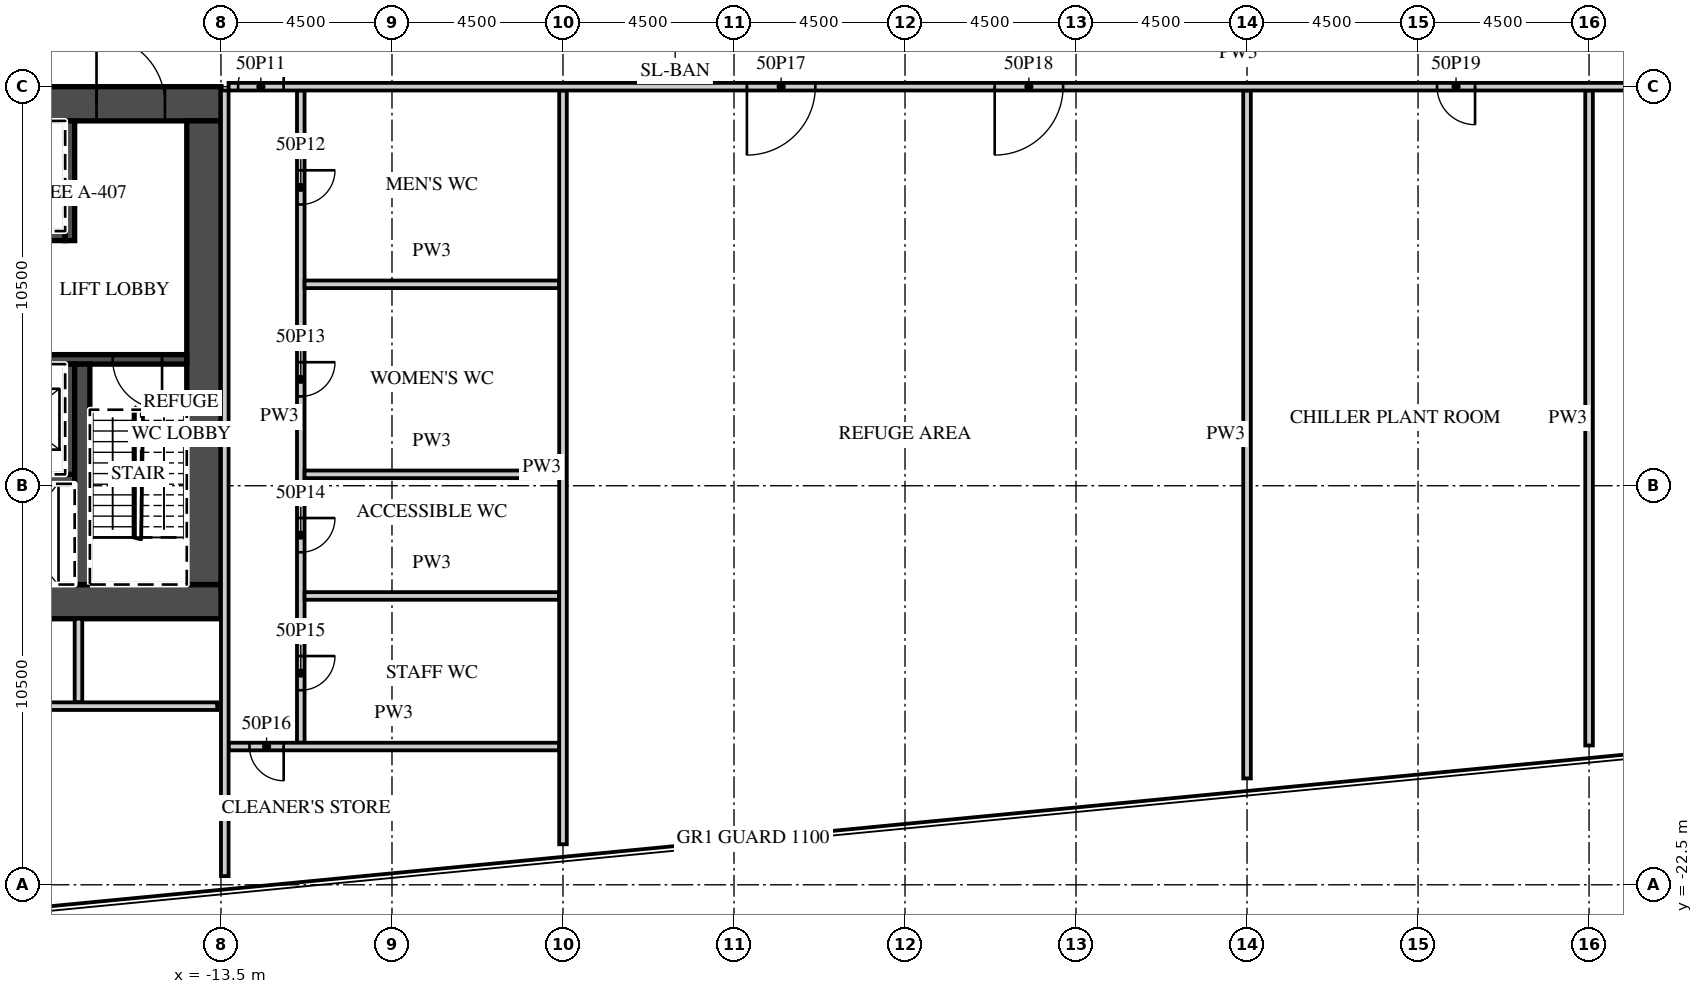
"""IFC4 building model, lengths in metres.
Left out: names, types, materials, properties, quantities, classifications, styles, units other than length and angle.
Written with IfcOpenShell. Run it as: python <this file> out.ifc"""

import sys

from ifc_helpers import new_model, si_unit, direction, frame, frame_2d, origin, place, context, subcontext, project, spatial, rectangle, extrude, element, fill, save


model = new_model("IFC4")
c1 = context("Model", 3, precision=1e-05, world=origin(), true_north=direction((0.0, 1.0)))
c2 = subcontext(c1, "Body", "Model", "MODEL_VIEW")
j1 = project(units=[si_unit("LENGTHUNIT", "METRE"), si_unit("PLANEANGLEUNIT", "RADIAN")], contexts=[c1])
p1 = place(None, origin())
s1 = spatial("IfcSite", under=j1, at=p1, CompositionType="ELEMENT")
p2 = place(p1, origin())
s2 = spatial("IfcBuilding", under=s1, at=p2, CompositionType="ELEMENT")
p3 = place(p2, frame((0.0, 0.0, 206.5)))
s3 = spatial("IfcBuildingStorey", under=s2, at=p3, CompositionType="ELEMENT", Elevation=206.5)
p4 = place(p3, frame((-31.5, -1.95, 0.0), z_axis=(0.0, 0.0, 1.0), x_axis=(1.0, 0.0, 0.0)))
e1 = element("IfcWall", 1, at=p4, inside=s3, PredefinedType="SHEAR", context=c2, shape_type="SweptSolid", body=[
    extrude(rectangle(XDim=18.0, YDim=0.9, at=frame_2d((9.0, 0.0))), origin(), (0.0, 0.0, 1.0), 4.2),
])
p5 = place(p4, frame((14.725, 0.0, 0.0)))
e2 = element("IfcOpeningElement", 2, at=p5, cuts=e1, PredefinedType="OPENING", context=c2, shape_type="SweptSolid", body=[
    extrude(rectangle(XDim=1.8, YDim=2.1, at=frame_2d((0.9, 1.05))), frame((0.0, 0.46, 0.0), z_axis=(0.0, -1.0, 0.0), x_axis=(1.0, 0.0, 0.0)), (0.0, 0.0, 1.0), 0.92),
])
p6 = place(p3, frame((-20.3, -15.05, 0.0), z_axis=(0.0, 0.0, 1.0), x_axis=(1.0, 0.0, 0.0)))
e3 = element("IfcWall", 3, at=p6, inside=s3, PredefinedType="SHEAR", context=c2, shape_type="SweptSolid", body=[
    extrude(rectangle(XDim=6.8, YDim=0.9, at=frame_2d((3.4, 0.0))), origin(), (0.0, 0.0, 1.0), 4.2),
])
p7 = place(p6, frame((0.875, 0.0, 0.0)))
e4 = element("IfcOpeningElement", 4, at=p7, cuts=e3, PredefinedType="OPENING", context=c2, shape_type="SweptSolid", body=[
    extrude(rectangle(XDim=1.2, YDim=2.1, at=frame_2d((0.6, 1.05))), frame((0.0, 0.46, 0.0), z_axis=(0.0, -1.0, 0.0), x_axis=(1.0, 0.0, 0.0)), (0.0, 0.0, 1.0), 0.92),
])
p8 = place(p3, frame((-13.95, -14.6, 0.0), z_axis=(0.0, 0.0, 1.0), x_axis=(0.0, 1.0, 0.0)))
e5 = element("IfcWall", 5, at=p8, inside=s3, PredefinedType="SHEAR", context=c2, shape_type="SweptSolid", body=[
    extrude(rectangle(XDim=12.2, YDim=0.9, at=frame_2d((6.1, 0.0))), origin(), (0.0, 0.0, 1.0), 4.2),
])
p9 = place(p3, frame((-30.6, -5.425, 0.0), z_axis=(0.0, 0.0, 1.0), x_axis=(1.0, 0.0, 0.0)))
e6 = element("IfcWall", 6, at=p9, inside=s3, PredefinedType="SHEAR", context=c2, shape_type="SweptSolid", body=[
    extrude(rectangle(XDim=13.0, YDim=0.25, at=frame_2d((6.5, 0.0))), origin(), (0.0, 0.0, 1.0), 4.2),
])
p10 = place(p9, frame((3.325, 0.0, 0.0)))
e7 = element("IfcOpeningElement", 7, at=p10, cuts=e6, PredefinedType="OPENING", context=c2, shape_type="SweptSolid", body=[
    extrude(rectangle(XDim=1.2, YDim=2.1, at=frame_2d((0.6, 1.05))), frame((0.0, 0.135, 0.0), z_axis=(0.0, -1.0, 0.0), x_axis=(1.0, 0.0, 0.0)), (0.0, 0.0, 1.0), 0.27),
])
p11 = place(p9, frame((5.925, 0.0, 0.0)))
e8 = element("IfcOpeningElement", 8, at=p11, cuts=e6, PredefinedType="OPENING", context=c2, shape_type="SweptSolid", body=[
    extrude(rectangle(XDim=1.2, YDim=2.1, at=frame_2d((0.6, 1.05))), frame((0.0, 0.135, 0.0), z_axis=(0.0, -1.0, 0.0), x_axis=(1.0, 0.0, 0.0)), (0.0, 0.0, 1.0), 0.27),
])
p12 = place(p3, frame((-17.475, -5.55, 0.0), z_axis=(0.0, 0.0, 1.0), x_axis=(0.0, 1.0, 0.0)))
e9 = element("IfcWall", 9, at=p12, inside=s3, PredefinedType="SHEAR", context=c2, shape_type="SweptSolid", body=[
    extrude(rectangle(XDim=3.15, YDim=0.25, at=frame_2d((1.575, 0.0))), origin(), (0.0, 0.0, 1.0), 4.2),
])
p13 = place(p3, frame((-30.6, -8.675, 0.0), z_axis=(0.0, 0.0, 1.0), x_axis=(1.0, 0.0, 0.0)))
e10 = element("IfcWall", 10, at=p13, inside=s3, PredefinedType="SHEAR", context=c2, shape_type="SweptSolid", body=[
    extrude(rectangle(XDim=16.2, YDim=0.25, at=frame_2d((8.1, 0.0))), origin(), (0.0, 0.0, 1.0), 4.2),
])
p14 = place(p13, frame((8.55, 0.0, 0.0)))
e11 = element("IfcOpeningElement", 11, at=p14, cuts=e10, PredefinedType="OPENING", context=c2, shape_type="SweptSolid", body=[
    extrude(rectangle(XDim=1.2, YDim=2.1, at=frame_2d((0.6, 1.05))), frame((0.0, 0.135, 0.0), z_axis=(0.0, -1.0, 0.0), x_axis=(1.0, 0.0, 0.0)), (0.0, 0.0, 1.0), 0.27),
])
p15 = place(p13, frame((11.2, 0.0, 0.0)))
e12 = element("IfcOpeningElement", 12, at=p15, cuts=e10, PredefinedType="OPENING", context=c2, shape_type="SweptSolid", body=[
    extrude(rectangle(XDim=1.2, YDim=2.1, at=frame_2d((0.6, 1.05))), frame((0.0, 0.135, 0.0), z_axis=(0.0, -1.0, 0.0), x_axis=(1.0, 0.0, 0.0)), (0.0, 0.0, 1.0), 0.27),
])
p16 = place(p13, frame((14.25, 0.0, 0.0)))
e13 = element("IfcOpeningElement", 13, at=p16, cuts=e10, PredefinedType="OPENING", context=c2, shape_type="SweptSolid", body=[
    extrude(rectangle(XDim=1.3, YDim=2.1, at=frame_2d((0.65, 1.05))), frame((0.0, 0.135, 0.0), z_axis=(0.0, -1.0, 0.0), x_axis=(1.0, 0.0, 0.0)), (0.0, 0.0, 1.0), 0.27),
])
p17 = place(p13, frame((1.637, 0.0, 0.0)))
e14 = element("IfcOpeningElement", 14, at=p17, cuts=e10, PredefinedType="OPENING", context=c2, shape_type="SweptSolid", body=[
    extrude(rectangle(XDim=1.0, YDim=2.1, at=frame_2d((0.5, 1.05))), frame((0.0, 0.135, 0.0), z_axis=(0.0, -1.0, 0.0), x_axis=(1.0, 0.0, 0.0)), (0.0, 0.0, 1.0), 0.27),
])
p18 = place(p13, frame((5.613, 0.0, 0.0)))
e15 = element("IfcOpeningElement", 15, at=p18, cuts=e10, PredefinedType="OPENING", context=c2, shape_type="SweptSolid", body=[
    extrude(rectangle(XDim=1.0, YDim=2.1, at=frame_2d((0.5, 1.05))), frame((0.0, 0.135, 0.0), z_axis=(0.0, -1.0, 0.0), x_axis=(1.0, 0.0, 0.0)), (0.0, 0.0, 1.0), 0.27),
])
p19 = place(p3, frame((-30.6, -11.825, 0.0), z_axis=(0.0, 0.0, 1.0), x_axis=(1.0, 0.0, 0.0)))
e16 = element("IfcWall", 16, at=p19, inside=s3, PredefinedType="SHEAR", context=c2, shape_type="SweptSolid", body=[
    extrude(rectangle(XDim=13.25, YDim=0.25, at=frame_2d((6.625, 0.0))), origin(), (0.0, 0.0, 1.0), 4.2),
])
p20 = place(p3, frame((-17.475, -11.7, 0.0), z_axis=(0.0, 0.0, 1.0), x_axis=(0.0, 1.0, 0.0)))
e17 = element("IfcWall", 17, at=p20, inside=s3, PredefinedType="SHEAR", context=c2, shape_type="SweptSolid", body=[
    extrude(rectangle(XDim=2.9, YDim=0.25, at=frame_2d((1.45, 0.0))), origin(), (0.0, 0.0, 1.0), 4.2),
])
p21 = place(p3, frame((-17.15, -14.6, 0.0), z_axis=(0.0, 0.0, 1.0), x_axis=(0.0, 1.0, 0.0)))
e18 = element("IfcWall", 18, at=p21, inside=s3, PredefinedType="SHEAR", context=c2, shape_type="SweptSolid", body=[
    extrude(rectangle(XDim=5.8, YDim=0.4, at=frame_2d((2.9, 0.0))), origin(), (0.0, 0.0, 1.0), 4.2),
])
p22 = place(p3, frame((-17.25, -17.7, 0.0), z_axis=(0.0, 0.0, 1.0), x_axis=(0.0, 1.0, 0.0)))
e19 = element("IfcWall", 19, at=p22, inside=s3, PredefinedType="PARTITIONING", context=c2, shape_type="SweptSolid", body=[
    extrude(rectangle(XDim=2.2, YDim=0.2, at=frame_2d((1.1, 0.0))), origin(), (0.0, 0.0, 1.0), 4.2),
])
p23 = place(p3, frame((-41.074, -17.8, 0.0), z_axis=(0.0, 0.0, 1.0), x_axis=(1.0, 0.0, 0.0)))
e20 = element("IfcWall", 20, at=p23, inside=s3, PredefinedType="PARTITIONING", context=c2, shape_type="SweptSolid", body=[
    extrude(rectangle(XDim=27.474, YDim=0.2, at=frame_2d((13.737, 0.0))), origin(), (0.0, 0.0, 1.0), 4.2),
])
p24 = place(p23, frame((8.762, 0.0, 0.0)))
e21 = element("IfcOpeningElement", 21, at=p24, cuts=e20, PredefinedType="OPENING", context=c2, shape_type="SweptSolid", body=[
    extrude(rectangle(XDim=0.9, YDim=2.1, at=frame_2d((0.45, 1.05))), frame((0.0, 0.11, 0.0), z_axis=(0.0, -1.0, 0.0), x_axis=(1.0, 0.0, 0.0)), (0.0, 0.0, 1.0), 0.22),
])
p25 = place(p23, frame((17.062, 0.0, 0.0)))
e22 = element("IfcOpeningElement", 22, at=p25, cuts=e20, PredefinedType="OPENING", context=c2, shape_type="SweptSolid", body=[
    extrude(rectangle(XDim=0.9, YDim=2.1, at=frame_2d((0.45, 1.05))), frame((0.0, 0.11, 0.0), z_axis=(0.0, -1.0, 0.0), x_axis=(1.0, 0.0, 0.0)), (0.0, 0.0, 1.0), 0.22),
])
p26 = place(p3, frame((-11.4, -18.762, 0.0), z_axis=(0.0, 0.0, 1.0), x_axis=(0.0, 1.0, 0.0)))
e23 = element("IfcWall", 23, at=p26, inside=s3, PredefinedType="PARTITIONING", context=c2, shape_type="SweptSolid", body=[
    extrude(rectangle(XDim=17.162, YDim=0.2, at=frame_2d((8.581, 0.0))), origin(), (0.0, 0.0, 1.0), 4.2),
])
p27 = place(p26, frame((14.162, 0.0, 0.0)))
e24 = element("IfcOpeningElement", 24, at=p27, cuts=e23, PredefinedType="OPENING", context=c2, shape_type="SweptSolid", body=[
    extrude(rectangle(XDim=0.9, YDim=2.1, at=frame_2d((0.45, 1.05))), frame((0.0, 0.11, 0.0), z_axis=(0.0, -1.0, 0.0), x_axis=(1.0, 0.0, 0.0)), (0.0, 0.0, 1.0), 0.22),
])
p28 = place(p26, frame((9.112, 0.0, 0.0)))
e25 = element("IfcOpeningElement", 25, at=p28, cuts=e23, PredefinedType="OPENING", context=c2, shape_type="SweptSolid", body=[
    extrude(rectangle(XDim=0.9, YDim=2.1, at=frame_2d((0.45, 1.05))), frame((0.0, 0.11, 0.0), z_axis=(0.0, -1.0, 0.0), x_axis=(1.0, 0.0, 0.0)), (0.0, 0.0, 1.0), 0.22),
])
p29 = place(p26, frame((5.012, 0.0, 0.0)))
e26 = element("IfcOpeningElement", 26, at=p29, cuts=e23, PredefinedType="OPENING", context=c2, shape_type="SweptSolid", body=[
    extrude(rectangle(XDim=0.9, YDim=2.1, at=frame_2d((0.45, 1.05))), frame((0.0, 0.11, 0.0), z_axis=(0.0, -1.0, 0.0), x_axis=(1.0, 0.0, 0.0)), (0.0, 0.0, 1.0), 0.22),
])
p30 = place(p26, frame((1.381, 0.0, 0.0)))
e27 = element("IfcOpeningElement", 27, at=p30, cuts=e23, PredefinedType="OPENING", context=c2, shape_type="SweptSolid", body=[
    extrude(rectangle(XDim=0.9, YDim=2.1, at=frame_2d((0.45, 1.05))), frame((0.0, 0.11, 0.0), z_axis=(0.0, -1.0, 0.0), x_axis=(1.0, 0.0, 0.0)), (0.0, 0.0, 1.0), 0.22),
])
for number, where, z_axis, x_axis in (
    (28, (-11.3, -6.7, 0.0), (0.0, 0.0, 1.0), (1.0, 0.0, 0.0)),
    (29, (-11.3, -11.7, 0.0), (0.0, 0.0, 1.0), (1.0, 0.0, 0.0)),
    (30, (-11.3, -14.9, 0.0), (0.0, 0.0, 1.0), (1.0, 0.0, 0.0)),
):
    element("IfcWall", number, at=place(p3, frame(where, z_axis=z_axis, x_axis=x_axis)), inside=s3, PredefinedType="PARTITIONING", context=c2, shape_type="SweptSolid", body=[
        extrude(rectangle(XDim=6.7, YDim=0.2, at=frame_2d((3.35, 0.0))), origin(), (0.0, 0.0, 1.0), 4.2),
    ])
p31 = place(p3, frame((-13.3, -18.862, 0.0), z_axis=(0.0, 0.0, 1.0), x_axis=(1.0, 0.0, 0.0)))
e31 = element("IfcWall", 31, at=p31, inside=s3, PredefinedType="PARTITIONING", context=c2, shape_type="SweptSolid", body=[
    extrude(rectangle(XDim=8.7, YDim=0.2, at=frame_2d((4.35, 0.0))), origin(), (0.0, 0.0, 1.0), 4.2),
])
p32 = place(p31, frame((0.55, 0.0, 0.0)))
e32 = element("IfcOpeningElement", 32, at=p32, cuts=e31, PredefinedType="OPENING", context=c2, shape_type="SweptSolid", body=[
    extrude(rectangle(XDim=0.9, YDim=2.1, at=frame_2d((0.45, 1.05))), frame((0.0, 0.11, 0.0), z_axis=(0.0, -1.0, 0.0), x_axis=(1.0, 0.0, 0.0)), (0.0, 0.0, 1.0), 0.22),
])
p33 = place(p3, frame((-4.5, -21.434, 0.0), z_axis=(0.0, 0.0, 1.0), x_axis=(0.0, 1.0, 0.0)))
e33 = element("IfcWall", 33, at=p33, inside=s3, PredefinedType="PARTITIONING", context=c2, shape_type="SweptSolid", body=[
    extrude(rectangle(XDim=19.834, YDim=0.2, at=frame_2d((9.917, 0.0))), origin(), (0.0, 0.0, 1.0), 4.2),
])
p34 = place(p3, frame((13.5, -19.701, 0.0), z_axis=(0.0, 0.0, 1.0), x_axis=(0.0, 1.0, 0.0)))
e34 = element("IfcWall", 34, at=p34, inside=s3, PredefinedType="PARTITIONING", context=c2, shape_type="SweptSolid", body=[
    extrude(rectangle(XDim=18.101, YDim=0.2, at=frame_2d((9.05, 0.0))), origin(), (0.0, 0.0, 1.0), 4.2),
])
p35 = place(p3, frame((22.5, -18.834, 0.0), z_axis=(0.0, 0.0, 1.0), x_axis=(0.0, 1.0, 0.0)))
e35 = element("IfcWall", 35, at=p35, inside=s3, PredefinedType="PARTITIONING", context=c2, shape_type="SweptSolid", body=[
    extrude(rectangle(XDim=17.234, YDim=0.2, at=frame_2d((8.617, 0.0))), origin(), (0.0, 0.0, 1.0), 4.2),
])
p36 = place(p3, frame((-13.3, -1.5, 0.0), z_axis=(0.0, 0.0, 1.0), x_axis=(1.0, 0.0, 0.0)))
e36 = element("IfcWall", 36, at=p36, inside=s3, PredefinedType="PARTITIONING", context=c2, shape_type="SweptSolid", body=[
    extrude(rectangle(XDim=53.146, YDim=0.2, at=frame_2d((26.573, 0.0))), origin(), (0.0, 0.0, 1.0), 4.2),
])
p37 = place(p36, frame((0.25, 0.0, 0.0)))
e37 = element("IfcOpeningElement", 37, at=p37, cuts=e36, PredefinedType="OPENING", context=c2, shape_type="SweptSolid", body=[
    extrude(rectangle(XDim=1.2, YDim=2.1, at=frame_2d((0.6, 1.05))), frame((0.0, 0.11, 0.0), z_axis=(0.0, -1.0, 0.0), x_axis=(1.0, 0.0, 0.0)), (0.0, 0.0, 1.0), 0.22),
])
p38 = place(p36, frame((13.64, 0.0, 0.0)))
e38 = element("IfcOpeningElement", 38, at=p38, cuts=e36, PredefinedType="OPENING", context=c2, shape_type="SweptSolid", body=[
    extrude(rectangle(XDim=1.8, YDim=2.1, at=frame_2d((0.9, 1.05))), frame((0.0, 0.11, 0.0), z_axis=(0.0, -1.0, 0.0), x_axis=(1.0, 0.0, 0.0)), (0.0, 0.0, 1.0), 0.22),
])
p39 = place(p36, frame((20.16, 0.0, 0.0)))
e39 = element("IfcOpeningElement", 39, at=p39, cuts=e36, PredefinedType="OPENING", context=c2, shape_type="SweptSolid", body=[
    extrude(rectangle(XDim=1.8, YDim=2.1, at=frame_2d((0.9, 1.05))), frame((0.0, 0.11, 0.0), z_axis=(0.0, -1.0, 0.0), x_axis=(1.0, 0.0, 0.0)), (0.0, 0.0, 1.0), 0.22),
])
p40 = place(p36, frame((31.8, 0.0, 0.0)))
e40 = element("IfcOpeningElement", 40, at=p40, cuts=e36, PredefinedType="OPENING", context=c2, shape_type="SweptSolid", body=[
    extrude(rectangle(XDim=1.0, YDim=2.1, at=frame_2d((0.5, 1.05))), frame((0.0, 0.11, 0.0), z_axis=(0.0, -1.0, 0.0), x_axis=(1.0, 0.0, 0.0)), (0.0, 0.0, 1.0), 0.22),
])
p41 = place(p36, frame((40.8, 0.0, 0.0)))
e41 = element("IfcOpeningElement", 41, at=p41, cuts=e36, PredefinedType="OPENING", context=c2, shape_type="SweptSolid", body=[
    extrude(rectangle(XDim=1.8, YDim=2.1, at=frame_2d((0.9, 1.05))), frame((0.0, 0.11, 0.0), z_axis=(0.0, -1.0, 0.0), x_axis=(1.0, 0.0, 0.0)), (0.0, 0.0, 1.0), 0.22),
])
p42 = place(p36, frame((46.572, 0.0, 0.0)))
e42 = element("IfcOpeningElement", 42, at=p42, cuts=e36, PredefinedType="OPENING", context=c2, shape_type="SweptSolid", body=[
    extrude(rectangle(XDim=1.8, YDim=2.1, at=frame_2d((0.9, 1.05))), frame((0.0, 0.11, 0.0), z_axis=(0.0, -1.0, 0.0), x_axis=(1.0, 0.0, 0.0)), (0.0, 0.0, 1.0), 0.22),
])
p43 = place(p36, frame((50.001, 0.0, 0.0)))
e43 = element("IfcOpeningElement", 43, at=p43, cuts=e36, PredefinedType="OPENING", context=c2, shape_type="SweptSolid", body=[
    extrude(rectangle(XDim=1.8, YDim=2.1, at=frame_2d((0.9, 1.05))), frame((0.0, 0.11, 0.0), z_axis=(0.0, -1.0, 0.0), x_axis=(1.0, 0.0, 0.0)), (0.0, 0.0, 1.0), 0.22),
])
p44 = place(p3, frame((-13.4, -22.271, 0.0), z_axis=(0.0, 0.0, 1.0), x_axis=(0.0, 1.0, 0.0)))
e44 = element("IfcWall", 44, at=p44, inside=s3, PredefinedType="PARTITIONING", context=c2, shape_type="SweptSolid", body=[
    extrude(rectangle(XDim=20.671, YDim=0.2, at=frame_2d((10.336, 0.0))), origin(), (0.0, 0.0, 1.0), 4.2),
])
p45 = place(p5, origin())
e45 = element("IfcDoor", 45, at=p45, inside=s3, OperationType="DOUBLE_DOOR_DOUBLE_SWING", PredefinedType="DOOR", context=c2, shape_type="SweptSolid", body=[
    extrude(rectangle(XDim=1.8, YDim=2.1, at=frame_2d((0.9, 1.05))), frame((0.0, 0.025, 0.0), z_axis=(0.0, -1.0, 0.0), x_axis=(1.0, 0.0, 0.0)), (0.0, 0.0, 1.0), 0.05),
])
fill(e2, e45)
p46 = place(p16, origin())
e46 = element("IfcDoor", 46, at=p46, inside=s3, OperationType="SINGLE_SWING_RIGHT", PredefinedType="DOOR", context=c2, shape_type="SweptSolid", body=[
    extrude(rectangle(XDim=1.3, YDim=2.1, at=frame_2d((0.65, 1.05))), frame((0.0, 0.025, 0.0), z_axis=(0.0, -1.0, 0.0), x_axis=(1.0, 0.0, 0.0)), (0.0, 0.0, 1.0), 0.05),
])
fill(e13, e46)
p47 = place(p37, origin())
e47 = element("IfcDoor", 47, at=p47, inside=s3, OperationType="SINGLE_SWING_RIGHT", PredefinedType="DOOR", context=c2, shape_type="SweptSolid", body=[
    extrude(rectangle(XDim=1.2, YDim=2.1, at=frame_2d((0.6, 1.05))), frame((0.0, 0.025, 0.0), z_axis=(0.0, -1.0, 0.0), x_axis=(1.0, 0.0, 0.0)), (0.0, 0.0, 1.0), 0.05),
])
fill(e37, e47)
p48 = place(p27, origin())
e48 = element("IfcDoor", 48, at=p48, inside=s3, OperationType="SINGLE_SWING_RIGHT", PredefinedType="DOOR", context=c2, shape_type="SweptSolid", body=[
    extrude(rectangle(XDim=0.9, YDim=2.1, at=frame_2d((0.45, 1.05))), frame((0.0, 0.025, 0.0), z_axis=(0.0, -1.0, 0.0), x_axis=(1.0, 0.0, 0.0)), (0.0, 0.0, 1.0), 0.05),
])
fill(e24, e48)
p49 = place(p28, origin())
e49 = element("IfcDoor", 49, at=p49, inside=s3, OperationType="SINGLE_SWING_RIGHT", PredefinedType="DOOR", context=c2, shape_type="SweptSolid", body=[
    extrude(rectangle(XDim=0.9, YDim=2.1, at=frame_2d((0.45, 1.05))), frame((0.0, 0.025, 0.0), z_axis=(0.0, -1.0, 0.0), x_axis=(1.0, 0.0, 0.0)), (0.0, 0.0, 1.0), 0.05),
])
fill(e25, e49)
p50 = place(p29, origin())
e50 = element("IfcDoor", 50, at=p50, inside=s3, OperationType="SINGLE_SWING_RIGHT", PredefinedType="DOOR", context=c2, shape_type="SweptSolid", body=[
    extrude(rectangle(XDim=0.9, YDim=2.1, at=frame_2d((0.45, 1.05))), frame((0.0, 0.025, 0.0), z_axis=(0.0, -1.0, 0.0), x_axis=(1.0, 0.0, 0.0)), (0.0, 0.0, 1.0), 0.05),
])
fill(e26, e50)
p51 = place(p30, origin())
e51 = element("IfcDoor", 51, at=p51, inside=s3, OperationType="SINGLE_SWING_RIGHT", PredefinedType="DOOR", context=c2, shape_type="SweptSolid", body=[
    extrude(rectangle(XDim=0.9, YDim=2.1, at=frame_2d((0.45, 1.05))), frame((0.0, 0.025, 0.0), z_axis=(0.0, -1.0, 0.0), x_axis=(1.0, 0.0, 0.0)), (0.0, 0.0, 1.0), 0.05),
])
fill(e27, e51)
p52 = place(p32, origin())
e52 = element("IfcDoor", 52, at=p52, inside=s3, OperationType="SINGLE_SWING_RIGHT", PredefinedType="DOOR", context=c2, shape_type="SweptSolid", body=[
    extrude(rectangle(XDim=0.9, YDim=2.1, at=frame_2d((0.45, 1.05))), frame((0.0, 0.025, 0.0), z_axis=(0.0, -1.0, 0.0), x_axis=(1.0, 0.0, 0.0)), (0.0, 0.0, 1.0), 0.05),
])
fill(e32, e52)
p53 = place(p38, origin())
e53 = element("IfcDoor", 53, at=p53, inside=s3, OperationType="DOUBLE_DOOR_DOUBLE_SWING", PredefinedType="DOOR", context=c2, shape_type="SweptSolid", body=[
    extrude(rectangle(XDim=1.8, YDim=2.1, at=frame_2d((0.9, 1.05))), frame((0.0, 0.025, 0.0), z_axis=(0.0, -1.0, 0.0), x_axis=(1.0, 0.0, 0.0)), (0.0, 0.0, 1.0), 0.05),
])
fill(e38, e53)
p54 = place(p39, origin())
e54 = element("IfcDoor", 54, at=p54, inside=s3, OperationType="DOUBLE_DOOR_DOUBLE_SWING", PredefinedType="DOOR", context=c2, shape_type="SweptSolid", body=[
    extrude(rectangle(XDim=1.8, YDim=2.1, at=frame_2d((0.9, 1.05))), frame((0.0, 0.025, 0.0), z_axis=(0.0, -1.0, 0.0), x_axis=(1.0, 0.0, 0.0)), (0.0, 0.0, 1.0), 0.05),
])
fill(e39, e54)
p55 = place(p40, origin())
e55 = element("IfcDoor", 55, at=p55, inside=s3, OperationType="SINGLE_SWING_RIGHT", PredefinedType="DOOR", context=c2, shape_type="SweptSolid", body=[
    extrude(rectangle(XDim=1.0, YDim=2.1, at=frame_2d((0.5, 1.05))), frame((0.0, 0.025, 0.0), z_axis=(0.0, -1.0, 0.0), x_axis=(1.0, 0.0, 0.0)), (0.0, 0.0, 1.0), 0.05),
])
fill(e40, e55)
save(model, sys.argv[1])
